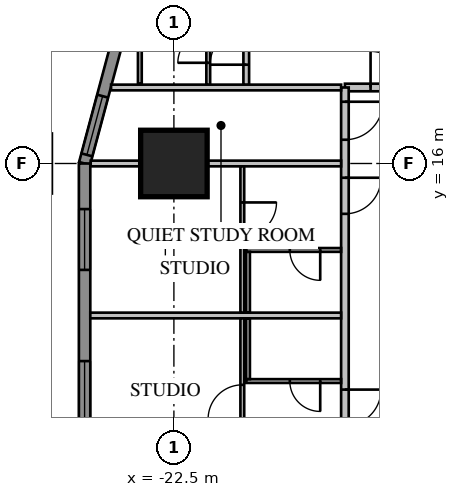
"""IFC4 building model, lengths in metres.
Left out: names, types, materials, properties, quantities, classifications, styles, units other than length and angle.
Written with IfcOpenShell. Run it as: python <this file> out.ifc"""

import sys

from ifc_helpers import new_model, si_unit, direction, frame, frame_2d, origin, origin_2d, place, context, subcontext, project, spatial, rectangle, extrude, element, fill, save


model = new_model("IFC4")
c1 = context("Model", 3, precision=1e-05, world=origin(), true_north=direction((0.0, 1.0)))
c2 = subcontext(c1, "Body", "Model", "MODEL_VIEW")
j1 = project(units=[si_unit("LENGTHUNIT", "METRE"), si_unit("PLANEANGLEUNIT", "RADIAN")], contexts=[c1])
p1 = place(None, origin())
s1 = spatial("IfcSite", under=j1, at=p1, CompositionType="ELEMENT")
p2 = place(p1, origin())
s2 = spatial("IfcBuilding", under=s1, at=p2, CompositionType="ELEMENT")
p3 = place(p2, frame((0.0, 0.0, 42.95)))
s3 = spatial("IfcBuildingStorey", under=s2, at=p3, CompositionType="ELEMENT", Elevation=42.95)
p4 = place(p3, frame((-22.5, 16.0, 0.0), z_axis=(0.0, 0.0, 1.0), x_axis=(1.0, 0.0, 0.0)))
e1 = element("IfcColumn", 1, at=p4, inside=s3, PredefinedType="COLUMN", context=c2, shape_type="SweptSolid", body=[
    extrude(rectangle(XDim=1.75, YDim=1.75, at=origin_2d()), origin(), (0.0, 0.0, 1.0), 3.85),
])
p5 = place(p3, frame((-23.664, 20.425, 0.0), z_axis=(0.0, 0.0, 1.0), x_axis=(-0.258839972501, -0.965920218567, 0.0)))
e2 = element("IfcWall", 2, at=p5, inside=s3, PredefinedType="SOLIDWALL", context=c2, shape_type="SweptSolid", body=[
    extrude(rectangle(XDim=4.581, YDim=0.3, at=frame_2d((2.291, 0.0))), origin(), (0.0, 0.0, 1.0), 3.65),
])
p6 = place(p5, frame((2.746, 0.0, 0.75)))
e3 = element("IfcOpeningElement", 3, at=p6, cuts=e2, PredefinedType="OPENING", context=c2, shape_type="SweptSolid", body=[
    extrude(rectangle(XDim=1.6, YDim=1.8, at=frame_2d((0.8, 0.9))), frame((0.0, 0.17, 0.0), z_axis=(0.0, -1.0, 0.0), x_axis=(1.0, 0.0, 0.0)), (0.0, 0.0, 1.0), 0.34),
])
p7 = place(p3, frame((-24.85, 16.0, 0.0), z_axis=(0.0, 0.0, 1.0), x_axis=(0.0, -1.0, 0.0)))
e4 = element("IfcWall", 4, at=p7, inside=s3, PredefinedType="SOLIDWALL", context=c2, shape_type="SweptSolid", body=[
    extrude(rectangle(XDim=32.0, YDim=0.3, at=frame_2d((16.0, 0.0))), origin(), (0.0, 0.0, 1.0), 3.65),
])
p8 = place(p7, frame((1.2, 0.0, 0.75)))
e5 = element("IfcOpeningElement", 5, at=p8, cuts=e4, PredefinedType="OPENING", context=c2, shape_type="SweptSolid", body=[
    extrude(rectangle(XDim=1.6, YDim=1.8, at=frame_2d((0.8, 0.9))), frame((0.0, 0.17, 0.0), z_axis=(0.0, -1.0, 0.0), x_axis=(1.0, 0.0, 0.0)), (0.0, 0.0, 1.0), 0.34),
])
p9 = place(p7, frame((5.2, 0.0, 0.75)))
e6 = element("IfcOpeningElement", 6, at=p9, cuts=e4, PredefinedType="OPENING", context=c2, shape_type="SweptSolid", body=[
    extrude(rectangle(XDim=1.6, YDim=1.8, at=frame_2d((0.8, 0.9))), frame((0.0, 0.17, 0.0), z_axis=(0.0, -1.0, 0.0), x_axis=(1.0, 0.0, 0.0)), (0.0, 0.0, 1.0), 0.34),
])
p10 = place(p7, frame((17.2, 0.0, 0.75)))
e7 = element("IfcOpeningElement", 7, at=p10, cuts=e4, PredefinedType="OPENING", context=c2, shape_type="SweptSolid", body=[
    extrude(rectangle(XDim=1.6, YDim=1.8, at=frame_2d((0.8, 0.9))), frame((0.0, 0.17, 0.0), z_axis=(0.0, -1.0, 0.0), x_axis=(1.0, 0.0, 0.0)), (0.0, 0.0, 1.0), 0.34),
])
p11 = place(p7, frame((21.2, 0.0, 0.75)))
e8 = element("IfcOpeningElement", 8, at=p11, cuts=e4, PredefinedType="OPENING", context=c2, shape_type="SweptSolid", body=[
    extrude(rectangle(XDim=1.6, YDim=1.8, at=frame_2d((0.8, 0.9))), frame((0.0, 0.17, 0.0), z_axis=(0.0, -1.0, 0.0), x_axis=(1.0, 0.0, 0.0)), (0.0, 0.0, 1.0), 0.34),
])
p12 = place(p7, frame((25.2, 0.0, 0.75)))
e9 = element("IfcOpeningElement", 9, at=p12, cuts=e4, PredefinedType="OPENING", context=c2, shape_type="SweptSolid", body=[
    extrude(rectangle(XDim=1.6, YDim=1.8, at=frame_2d((0.8, 0.9))), frame((0.0, 0.17, 0.0), z_axis=(0.0, -1.0, 0.0), x_axis=(1.0, 0.0, 0.0)), (0.0, 0.0, 1.0), 0.34),
])
p13 = place(p7, frame((29.2, 0.0, 0.75)))
e10 = element("IfcOpeningElement", 10, at=p13, cuts=e4, PredefinedType="OPENING", context=c2, shape_type="SweptSolid", body=[
    extrude(rectangle(XDim=1.6, YDim=1.8, at=frame_2d((0.8, 0.9))), frame((0.0, 0.17, 0.0), z_axis=(0.0, -1.0, 0.0), x_axis=(1.0, 0.0, 0.0)), (0.0, 0.0, 1.0), 0.34),
])
p14 = place(p7, frame((8.8, 0.0, 0.75)))
e11 = element("IfcOpeningElement", 11, at=p14, cuts=e4, PredefinedType="OPENING", context=c2, shape_type="SweptSolid", body=[
    extrude(rectangle(XDim=2.4, YDim=1.8, at=frame_2d((1.2, 0.9))), frame((0.0, 0.17, 0.0), z_axis=(0.0, -1.0, 0.0), x_axis=(1.0, 0.0, 0.0)), (0.0, 0.0, 1.0), 0.34),
])
p15 = place(p7, frame((13.812, 0.0, 0.0)))
e12 = element("IfcOpeningElement", 12, at=p15, cuts=e4, PredefinedType="OPENING", context=c2, shape_type="SweptSolid", body=[
    extrude(rectangle(XDim=1.0, YDim=2.4, at=frame_2d((0.5, 1.2))), frame((0.0, 0.17, 0.0), z_axis=(0.0, -1.0, 0.0), x_axis=(1.0, 0.0, 0.0)), (0.0, 0.0, 1.0), 0.34),
])
p16 = place(p3, frame((18.0, 18.0, 0.0), z_axis=(0.0, 0.0, 1.0), x_axis=(-1.0, 0.0, 0.0)))
e13 = element("IfcWall", 13, at=p16, inside=s3, PredefinedType="PARTITIONING", context=c2, shape_type="SweptSolid", body=[
    extrude(rectangle(XDim=36.0, YDim=0.2, at=frame_2d((18.0, 0.0))), origin(), (0.0, 0.0, 1.0), 3.65),
])
p17 = place(p16, frame((0.375, 0.0, 0.0)))
e14 = element("IfcOpeningElement", 14, at=p17, cuts=e13, PredefinedType="OPENING", context=c2, shape_type="SweptSolid", body=[
    extrude(rectangle(XDim=1.0, YDim=2.1, at=frame_2d((0.5, 1.05))), frame((0.0, 0.12, 0.0), z_axis=(0.0, -1.0, 0.0), x_axis=(1.0, 0.0, 0.0)), (0.0, 0.0, 1.0), 0.24),
])
p18 = place(p16, frame((3.95, 0.0, 0.0)))
e15 = element("IfcOpeningElement", 15, at=p18, cuts=e13, PredefinedType="OPENING", context=c2, shape_type="SweptSolid", body=[
    extrude(rectangle(XDim=0.95, YDim=2.1, at=frame_2d((0.475, 1.05))), frame((0.0, 0.12, 0.0), z_axis=(0.0, -1.0, 0.0), x_axis=(1.0, 0.0, 0.0)), (0.0, 0.0, 1.0), 0.24),
])
p19 = place(p16, frame((7.95, 0.0, 0.0)))
e16 = element("IfcOpeningElement", 16, at=p19, cuts=e13, PredefinedType="OPENING", context=c2, shape_type="SweptSolid", body=[
    extrude(rectangle(XDim=0.95, YDim=2.1, at=frame_2d((0.475, 1.05))), frame((0.0, 0.12, 0.0), z_axis=(0.0, -1.0, 0.0), x_axis=(1.0, 0.0, 0.0)), (0.0, 0.0, 1.0), 0.24),
])
p20 = place(p16, frame((19.95, 0.0, 0.0)))
e17 = element("IfcOpeningElement", 17, at=p20, cuts=e13, PredefinedType="OPENING", context=c2, shape_type="SweptSolid", body=[
    extrude(rectangle(XDim=0.95, YDim=2.1, at=frame_2d((0.475, 1.05))), frame((0.0, 0.12, 0.0), z_axis=(0.0, -1.0, 0.0), x_axis=(1.0, 0.0, 0.0)), (0.0, 0.0, 1.0), 0.24),
])
p21 = place(p16, frame((23.95, 0.0, 0.0)))
e18 = element("IfcOpeningElement", 18, at=p21, cuts=e13, PredefinedType="OPENING", context=c2, shape_type="SweptSolid", body=[
    extrude(rectangle(XDim=0.95, YDim=2.1, at=frame_2d((0.475, 1.05))), frame((0.0, 0.12, 0.0), z_axis=(0.0, -1.0, 0.0), x_axis=(1.0, 0.0, 0.0)), (0.0, 0.0, 1.0), 0.24),
])
p22 = place(p16, frame((27.95, 0.0, 0.0)))
e19 = element("IfcOpeningElement", 19, at=p22, cuts=e13, PredefinedType="OPENING", context=c2, shape_type="SweptSolid", body=[
    extrude(rectangle(XDim=0.95, YDim=2.1, at=frame_2d((0.475, 1.05))), frame((0.0, 0.12, 0.0), z_axis=(0.0, -1.0, 0.0), x_axis=(1.0, 0.0, 0.0)), (0.0, 0.0, 1.0), 0.24),
])
p23 = place(p16, frame((31.95, 0.0, 0.0)))
e20 = element("IfcOpeningElement", 20, at=p23, cuts=e13, PredefinedType="OPENING", context=c2, shape_type="SweptSolid", body=[
    extrude(rectangle(XDim=0.95, YDim=2.1, at=frame_2d((0.475, 1.05))), frame((0.0, 0.12, 0.0), z_axis=(0.0, -1.0, 0.0), x_axis=(1.0, 0.0, 0.0)), (0.0, 0.0, 1.0), 0.24),
])
p24 = place(p16, frame((34.375, 0.0, 0.0)))
e21 = element("IfcOpeningElement", 21, at=p24, cuts=e13, PredefinedType="OPENING", context=c2, shape_type="SweptSolid", body=[
    extrude(rectangle(XDim=0.95, YDim=2.1, at=frame_2d((0.475, 1.05))), frame((0.0, 0.12, 0.0), z_axis=(0.0, -1.0, 0.0), x_axis=(1.0, 0.0, 0.0)), (0.0, 0.0, 1.0), 0.24),
])
p25 = place(p16, frame((11.2, 0.0, 0.0)))
e22 = element("IfcOpeningElement", 22, at=p25, cuts=e13, PredefinedType="OPENING", context=c2, shape_type="SweptSolid", body=[
    extrude(rectangle(XDim=1.0, YDim=2.1, at=frame_2d((0.5, 1.05))), frame((0.0, 0.12, 0.0), z_axis=(0.0, -1.0, 0.0), x_axis=(1.0, 0.0, 0.0)), (0.0, 0.0, 1.0), 0.24),
])
p26 = place(p16, frame((15.2, 0.0, 0.0)))
e23 = element("IfcOpeningElement", 23, at=p26, cuts=e13, PredefinedType="OPENING", context=c2, shape_type="SweptSolid", body=[
    extrude(rectangle(XDim=1.0, YDim=2.1, at=frame_2d((0.5, 1.05))), frame((0.0, 0.12, 0.0), z_axis=(0.0, -1.0, 0.0), x_axis=(1.0, 0.0, 0.0)), (0.0, 0.0, 1.0), 0.24),
])
p27 = place(p3, frame((-21.596, 18.065, 0.0), z_axis=(0.0, 0.0, 1.0), x_axis=(0.0, 1.0, 0.0)))
e24 = element("IfcWall", 24, at=p27, inside=s3, PredefinedType="PARTITIONING", context=c2, shape_type="SweptSolid", body=[
    extrude(rectangle(XDim=2.335, YDim=0.1, at=frame_2d((1.167, 0.0))), origin(), (0.0, 0.0, 1.0), 3.65),
])
p28 = place(p27, frame((0.585, 0.0, 0.0)))
e25 = element("IfcOpeningElement", 25, at=p28, cuts=e24, PredefinedType="OPENING", context=c2, shape_type="SweptSolid", body=[
    extrude(rectangle(XDim=0.8, YDim=2.1, at=frame_2d((0.4, 1.05))), frame((0.0, 0.07, 0.0), z_axis=(0.0, -1.0, 0.0), x_axis=(1.0, 0.0, 0.0)), (0.0, 0.0, 1.0), 0.14),
])
p29 = place(p3, frame((-23.396, 18.1, 0.0), z_axis=(0.0, 0.0, 1.0), x_axis=(0.0, 1.0, 0.0)))
e26 = element("IfcWall", 26, at=p29, inside=s3, PredefinedType="PARTITIONING", context=c2, shape_type="SweptSolid", body=[
    extrude(rectangle(XDim=2.3, YDim=0.1, at=frame_2d((1.15, 0.0))), origin(), (0.0, 0.0, 1.0), 3.65),
])
p30 = place(p3, frame((-20.596, 18.065, 0.0), z_axis=(0.0, 0.0, 1.0), x_axis=(0.0, 1.0, 0.0)))
e27 = element("IfcWall", 27, at=p30, inside=s3, PredefinedType="PARTITIONING", context=c2, shape_type="SweptSolid", body=[
    extrude(rectangle(XDim=5.209, YDim=0.15, at=frame_2d((2.604, 0.0))), origin(), (0.0, 0.0, 1.0), 3.65),
])
p31 = place(p30, frame((0.535, 0.0, 0.0)))
e28 = element("IfcOpeningElement", 28, at=p31, cuts=e27, PredefinedType="OPENING", context=c2, shape_type="SweptSolid", body=[
    extrude(rectangle(XDim=0.95, YDim=2.1, at=frame_2d((0.475, 1.05))), frame((0.0, 0.095, 0.0), z_axis=(0.0, -1.0, 0.0), x_axis=(1.0, 0.0, 0.0)), (0.0, 0.0, 1.0), 0.19),
])
p32 = place(p3, frame((-18.0, 18.0, 0.0), z_axis=(0.0, 0.0, 1.0), x_axis=(0.0, -1.0, 0.0)))
e29 = element("IfcWall", 29, at=p32, inside=s3, PredefinedType="PARTITIONING", context=c2, shape_type="SweptSolid", body=[
    extrude(rectangle(XDim=36.0, YDim=0.2, at=frame_2d((18.0, 0.0))), origin(), (0.0, 0.0, 1.0), 3.65),
])
p33 = place(p32, frame((0.375, 0.0, 0.0)))
e30 = element("IfcOpeningElement", 30, at=p33, cuts=e29, PredefinedType="OPENING", context=c2, shape_type="SweptSolid", body=[
    extrude(rectangle(XDim=1.0, YDim=2.1, at=frame_2d((0.5, 1.05))), frame((0.0, 0.12, 0.0), z_axis=(0.0, -1.0, 0.0), x_axis=(1.0, 0.0, 0.0)), (0.0, 0.0, 1.0), 0.24),
])
p34 = place(p32, frame((2.375, 0.0, 0.0)))
e31 = element("IfcOpeningElement", 31, at=p34, cuts=e29, PredefinedType="OPENING", context=c2, shape_type="SweptSolid", body=[
    extrude(rectangle(XDim=0.95, YDim=2.1, at=frame_2d((0.475, 1.05))), frame((0.0, 0.12, 0.0), z_axis=(0.0, -1.0, 0.0), x_axis=(1.0, 0.0, 0.0)), (0.0, 0.0, 1.0), 0.24),
])
p35 = place(p32, frame((7.95, 0.0, 0.0)))
e32 = element("IfcOpeningElement", 32, at=p35, cuts=e29, PredefinedType="OPENING", context=c2, shape_type="SweptSolid", body=[
    extrude(rectangle(XDim=0.95, YDim=2.1, at=frame_2d((0.475, 1.05))), frame((0.0, 0.12, 0.0), z_axis=(0.0, -1.0, 0.0), x_axis=(1.0, 0.0, 0.0)), (0.0, 0.0, 1.0), 0.24),
])
p36 = place(p32, frame((18.375, 0.0, 0.0)))
e33 = element("IfcOpeningElement", 33, at=p36, cuts=e29, PredefinedType="OPENING", context=c2, shape_type="SweptSolid", body=[
    extrude(rectangle(XDim=0.95, YDim=2.1, at=frame_2d((0.475, 1.05))), frame((0.0, 0.12, 0.0), z_axis=(0.0, -1.0, 0.0), x_axis=(1.0, 0.0, 0.0)), (0.0, 0.0, 1.0), 0.24),
])
p37 = place(p32, frame((23.95, 0.0, 0.0)))
e34 = element("IfcOpeningElement", 34, at=p37, cuts=e29, PredefinedType="OPENING", context=c2, shape_type="SweptSolid", body=[
    extrude(rectangle(XDim=0.95, YDim=2.1, at=frame_2d((0.475, 1.05))), frame((0.0, 0.12, 0.0), z_axis=(0.0, -1.0, 0.0), x_axis=(1.0, 0.0, 0.0)), (0.0, 0.0, 1.0), 0.24),
])
p38 = place(p32, frame((26.375, 0.0, 0.0)))
e35 = element("IfcOpeningElement", 35, at=p38, cuts=e29, PredefinedType="OPENING", context=c2, shape_type="SweptSolid", body=[
    extrude(rectangle(XDim=0.95, YDim=2.1, at=frame_2d((0.475, 1.05))), frame((0.0, 0.12, 0.0), z_axis=(0.0, -1.0, 0.0), x_axis=(1.0, 0.0, 0.0)), (0.0, 0.0, 1.0), 0.24),
])
p39 = place(p32, frame((31.95, 0.0, 0.0)))
e36 = element("IfcOpeningElement", 36, at=p39, cuts=e29, PredefinedType="OPENING", context=c2, shape_type="SweptSolid", body=[
    extrude(rectangle(XDim=0.95, YDim=2.1, at=frame_2d((0.475, 1.05))), frame((0.0, 0.12, 0.0), z_axis=(0.0, -1.0, 0.0), x_axis=(1.0, 0.0, 0.0)), (0.0, 0.0, 1.0), 0.24),
])
p40 = place(p32, frame((34.375, 0.0, 0.0)))
e37 = element("IfcOpeningElement", 37, at=p40, cuts=e29, PredefinedType="OPENING", context=c2, shape_type="SweptSolid", body=[
    extrude(rectangle(XDim=0.95, YDim=2.1, at=frame_2d((0.475, 1.05))), frame((0.0, 0.12, 0.0), z_axis=(0.0, -1.0, 0.0), x_axis=(1.0, 0.0, 0.0)), (0.0, 0.0, 1.0), 0.24),
])
p41 = place(p32, frame((11.2, 0.0, 0.0)))
e38 = element("IfcOpeningElement", 38, at=p41, cuts=e29, PredefinedType="OPENING", context=c2, shape_type="SweptSolid", body=[
    extrude(rectangle(XDim=1.0, YDim=2.1, at=frame_2d((0.5, 1.05))), frame((0.0, 0.12, 0.0), z_axis=(0.0, -1.0, 0.0), x_axis=(1.0, 0.0, 0.0)), (0.0, 0.0, 1.0), 0.24),
])
p42 = place(p3, frame((-18.1, 18.0, 0.0), z_axis=(0.0, 0.0, 1.0), x_axis=(-1.0, 0.0, 0.0)))
e39 = element("IfcWall", 39, at=p42, inside=s3, PredefinedType="PARTITIONING", context=c2, shape_type="SweptSolid", body=[
    extrude(rectangle(XDim=6.053, YDim=0.15, at=frame_2d((3.027, 0.0))), origin(), (0.0, 0.0, 1.0), 3.65),
])
p43 = place(p3, frame((-18.1, 16.0, 0.0), z_axis=(0.0, 0.0, 1.0), x_axis=(-1.0, 0.0, 0.0)))
e40 = element("IfcWall", 40, at=p43, inside=s3, PredefinedType="PARTITIONING", context=c2, shape_type="SweptSolid", body=[
    extrude(rectangle(XDim=6.589, YDim=0.15, at=frame_2d((3.295, 0.0))), origin(), (0.0, 0.0, 1.0), 3.65),
])
p44 = place(p3, frame((-18.1, 12.0, 0.0), z_axis=(0.0, 0.0, 1.0), x_axis=(-1.0, 0.0, 0.0)))
e41 = element("IfcWall", 41, at=p44, inside=s3, PredefinedType="PARTITIONING", context=c2, shape_type="SweptSolid", body=[
    extrude(rectangle(XDim=6.6, YDim=0.15, at=frame_2d((3.3, 0.0))), origin(), (0.0, 0.0, 1.0), 3.65),
])
p45 = place(p3, frame((-18.1, 13.725, 0.0), z_axis=(0.0, 0.0, 1.0), x_axis=(-1.0, 0.0, 0.0)))
e42 = element("IfcWall", 42, at=p45, inside=s3, PredefinedType="PARTITIONING", context=c2, shape_type="SweptSolid", body=[
    extrude(rectangle(XDim=2.5, YDim=0.1, at=frame_2d((1.25, 0.0))), origin(), (0.0, 0.0, 1.0), 3.65),
])
p46 = place(p45, frame((0.55, 0.0, 0.0)))
e43 = element("IfcOpeningElement", 43, at=p46, cuts=e42, PredefinedType="OPENING", context=c2, shape_type="SweptSolid", body=[
    extrude(rectangle(XDim=0.8, YDim=2.1, at=frame_2d((0.4, 1.05))), frame((0.0, 0.07, 0.0), z_axis=(0.0, -1.0, 0.0), x_axis=(1.0, 0.0, 0.0)), (0.0, 0.0, 1.0), 0.14),
])
p47 = place(p3, frame((-20.55, 13.675, 0.0), z_axis=(0.0, 0.0, 1.0), x_axis=(0.0, -1.0, 0.0)))
e44 = element("IfcWall", 44, at=p47, inside=s3, PredefinedType="PARTITIONING", context=c2, shape_type="SweptSolid", body=[
    extrude(rectangle(XDim=1.6, YDim=0.1, at=frame_2d((0.8, 0.0))), origin(), (0.0, 0.0, 1.0), 3.65),
])
p48 = place(p3, frame((-18.1, 10.275, 0.0), z_axis=(0.0, 0.0, 1.0), x_axis=(-1.0, 0.0, 0.0)))
e45 = element("IfcWall", 45, at=p48, inside=s3, PredefinedType="PARTITIONING", context=c2, shape_type="SweptSolid", body=[
    extrude(rectangle(XDim=2.5, YDim=0.1, at=frame_2d((1.25, 0.0))), origin(), (0.0, 0.0, 1.0), 3.65),
])
p49 = place(p48, frame((0.55, 0.0, 0.0)))
e46 = element("IfcOpeningElement", 46, at=p49, cuts=e45, PredefinedType="OPENING", context=c2, shape_type="SweptSolid", body=[
    extrude(rectangle(XDim=0.8, YDim=2.1, at=frame_2d((0.4, 1.05))), frame((0.0, 0.07, 0.0), z_axis=(0.0, -1.0, 0.0), x_axis=(1.0, 0.0, 0.0)), (0.0, 0.0, 1.0), 0.14),
])
p50 = place(p3, frame((-20.55, 11.925, 0.0), z_axis=(0.0, 0.0, 1.0), x_axis=(0.0, -1.0, 0.0)))
e47 = element("IfcWall", 47, at=p50, inside=s3, PredefinedType="PARTITIONING", context=c2, shape_type="SweptSolid", body=[
    extrude(rectangle(XDim=1.6, YDim=0.1, at=frame_2d((0.8, 0.0))), origin(), (0.0, 0.0, 1.0), 3.65),
])
p51 = place(p3, frame((-20.7, 15.925, 0.0), z_axis=(0.0, 0.0, 1.0), x_axis=(0.0, -1.0, 0.0)))
e48 = element("IfcWall", 48, at=p51, inside=s3, PredefinedType="PARTITIONING", context=c2, shape_type="SweptSolid", body=[
    extrude(rectangle(XDim=3.85, YDim=0.1, at=frame_2d((1.925, 0.0))), origin(), (0.0, 0.0, 1.0), 3.65),
])
p52 = place(p51, frame((0.95, 0.0, 0.0)))
e49 = element("IfcOpeningElement", 49, at=p52, cuts=e48, PredefinedType="OPENING", context=c2, shape_type="SweptSolid", body=[
    extrude(rectangle(XDim=0.9, YDim=2.1, at=frame_2d((0.45, 1.05))), frame((0.0, 0.07, 0.0), z_axis=(0.0, -1.0, 0.0), x_axis=(1.0, 0.0, 0.0)), (0.0, 0.0, 1.0), 0.14),
])
p53 = place(p3, frame((-20.7, 11.925, 0.0), z_axis=(0.0, 0.0, 1.0), x_axis=(0.0, -1.0, 0.0)))
e50 = element("IfcWall", 50, at=p53, inside=s3, PredefinedType="PARTITIONING", context=c2, shape_type="SweptSolid", body=[
    extrude(rectangle(XDim=3.85, YDim=0.1, at=frame_2d((1.925, 0.0))), origin(), (0.0, 0.0, 1.0), 3.65),
])
p54 = place(p53, frame((1.75, 0.0, 0.0)))
e51 = element("IfcOpeningElement", 51, at=p54, cuts=e50, PredefinedType="OPENING", context=c2, shape_type="SweptSolid", body=[
    extrude(rectangle(XDim=0.9, YDim=2.1, at=frame_2d((0.45, 1.05))), frame((0.0, 0.07, 0.0), z_axis=(0.0, -1.0, 0.0), x_axis=(1.0, 0.0, 0.0)), (0.0, 0.0, 1.0), 0.14),
])
p55 = place(p6, origin())
e52 = element("IfcWindow", 52, at=p55, inside=s3, PartitioningType="SINGLE_PANEL", PredefinedType="WINDOW", context=c2, shape_type="SweptSolid", body=[
    extrude(rectangle(XDim=1.6, YDim=1.8, at=frame_2d((0.8, 0.9))), frame((0.0, 0.03, 0.0), z_axis=(0.0, -1.0, 0.0), x_axis=(1.0, 0.0, 0.0)), (0.0, 0.0, 1.0), 0.06),
])
fill(e3, e52)
p56 = place(p8, origin())
e53 = element("IfcWindow", 53, at=p56, inside=s3, PartitioningType="SINGLE_PANEL", PredefinedType="WINDOW", context=c2, shape_type="SweptSolid", body=[
    extrude(rectangle(XDim=1.6, YDim=1.8, at=frame_2d((0.8, 0.9))), frame((0.0, 0.03, 0.0), z_axis=(0.0, -1.0, 0.0), x_axis=(1.0, 0.0, 0.0)), (0.0, 0.0, 1.0), 0.06),
])
fill(e5, e53)
p57 = place(p9, origin())
e54 = element("IfcWindow", 54, at=p57, inside=s3, PartitioningType="SINGLE_PANEL", PredefinedType="WINDOW", context=c2, shape_type="SweptSolid", body=[
    extrude(rectangle(XDim=1.6, YDim=1.8, at=frame_2d((0.8, 0.9))), frame((0.0, 0.03, 0.0), z_axis=(0.0, -1.0, 0.0), x_axis=(1.0, 0.0, 0.0)), (0.0, 0.0, 1.0), 0.06),
])
fill(e6, e54)
p58 = place(p24, origin())
e55 = element("IfcDoor", 55, at=p58, inside=s3, OperationType="SINGLE_SWING_RIGHT", PredefinedType="DOOR", context=c2, shape_type="SweptSolid", body=[
    extrude(rectangle(XDim=0.95, YDim=2.1, at=frame_2d((0.475, 1.05))), frame((0.0, 0.025, 0.0), z_axis=(0.0, -1.0, 0.0), x_axis=(1.0, 0.0, 0.0)), (0.0, 0.0, 1.0), 0.05),
])
fill(e21, e55)
p59 = place(p28, origin())
e56 = element("IfcDoor", 56, at=p59, inside=s3, OperationType="SINGLE_SWING_LEFT", PredefinedType="DOOR", context=c2, shape_type="SweptSolid", body=[
    extrude(rectangle(XDim=0.8, YDim=2.1, at=frame_2d((0.4, 1.05))), frame((0.0, 0.025, 0.0), z_axis=(0.0, -1.0, 0.0), x_axis=(1.0, 0.0, 0.0)), (0.0, 0.0, 1.0), 0.05),
])
fill(e25, e56)
p60 = place(p31, origin())
e57 = element("IfcDoor", 57, at=p60, inside=s3, OperationType="SINGLE_SWING_LEFT", PredefinedType="DOOR", context=c2, shape_type="SweptSolid", body=[
    extrude(rectangle(XDim=0.95, YDim=2.1, at=frame_2d((0.475, 1.05))), frame((0.0, 0.025, 0.0), z_axis=(0.0, -1.0, 0.0), x_axis=(1.0, 0.0, 0.0)), (0.0, 0.0, 1.0), 0.05),
])
fill(e28, e57)
p61 = place(p33, origin())
e58 = element("IfcDoor", 58, at=p61, inside=s3, OperationType="SINGLE_SWING_LEFT", PredefinedType="DOOR", context=c2, shape_type="SweptSolid", body=[
    extrude(rectangle(XDim=1.0, YDim=2.1, at=frame_2d((0.5, 1.05))), frame((0.0, 0.025, 0.0), z_axis=(0.0, -1.0, 0.0), x_axis=(1.0, 0.0, 0.0)), (0.0, 0.0, 1.0), 0.05),
])
fill(e30, e58)
p62 = place(p34, origin())
e59 = element("IfcDoor", 59, at=p62, inside=s3, OperationType="SINGLE_SWING_LEFT", PredefinedType="DOOR", context=c2, shape_type="SweptSolid", body=[
    extrude(rectangle(XDim=0.95, YDim=2.1, at=frame_2d((0.475, 1.05))), frame((0.0, 0.025, 0.0), z_axis=(0.0, -1.0, 0.0), x_axis=(1.0, 0.0, 0.0)), (0.0, 0.0, 1.0), 0.05),
])
fill(e31, e59)
p63 = place(p46, origin())
e60 = element("IfcDoor", 60, at=p63, inside=s3, OperationType="SINGLE_SWING_LEFT", PredefinedType="DOOR", context=c2, shape_type="SweptSolid", body=[
    extrude(rectangle(XDim=0.8, YDim=2.1, at=frame_2d((0.4, 1.05))), frame((0.0, 0.025, 0.0), z_axis=(0.0, -1.0, 0.0), x_axis=(1.0, 0.0, 0.0)), (0.0, 0.0, 1.0), 0.05),
])
fill(e43, e60)
p64 = place(p35, origin())
e61 = element("IfcDoor", 61, at=p64, inside=s3, OperationType="SINGLE_SWING_LEFT", PredefinedType="DOOR", context=c2, shape_type="SweptSolid", body=[
    extrude(rectangle(XDim=0.95, YDim=2.1, at=frame_2d((0.475, 1.05))), frame((0.0, 0.025, 0.0), z_axis=(0.0, -1.0, 0.0), x_axis=(1.0, 0.0, 0.0)), (0.0, 0.0, 1.0), 0.05),
])
fill(e32, e61)
p65 = place(p49, origin())
e62 = element("IfcDoor", 62, at=p65, inside=s3, OperationType="SINGLE_SWING_LEFT", PredefinedType="DOOR", context=c2, shape_type="SweptSolid", body=[
    extrude(rectangle(XDim=0.8, YDim=2.1, at=frame_2d((0.4, 1.05))), frame((0.0, 0.025, 0.0), z_axis=(0.0, -1.0, 0.0), x_axis=(1.0, 0.0, 0.0)), (0.0, 0.0, 1.0), 0.05),
])
fill(e46, e62)
p66 = place(p52, origin())
e63 = element("IfcDoor", 63, at=p66, inside=s3, OperationType="SINGLE_SWING_LEFT", PredefinedType="DOOR", context=c2, shape_type="SweptSolid", body=[
    extrude(rectangle(XDim=0.9, YDim=2.1, at=frame_2d((0.45, 1.05))), frame((0.0, 0.025, 0.0), z_axis=(0.0, -1.0, 0.0), x_axis=(1.0, 0.0, 0.0)), (0.0, 0.0, 1.0), 0.05),
])
fill(e49, e63)
p67 = place(p54, origin())
e64 = element("IfcDoor", 64, at=p67, inside=s3, OperationType="SINGLE_SWING_RIGHT", PredefinedType="DOOR", context=c2, shape_type="SweptSolid", body=[
    extrude(rectangle(XDim=0.9, YDim=2.1, at=frame_2d((0.45, 1.05))), frame((0.0, 0.025, 0.0), z_axis=(0.0, -1.0, 0.0), x_axis=(1.0, 0.0, 0.0)), (0.0, 0.0, 1.0), 0.05),
])
fill(e51, e64)
save(model, sys.argv[1])
